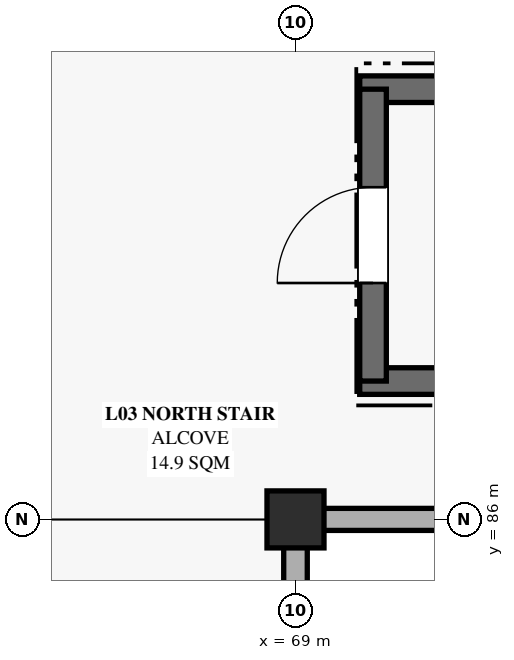
"""IFC4 building model, lengths in metres.
Left out: names, types, materials, properties, quantities, classifications, styles, units other than length and angle.
Written with IfcOpenShell. Run it as: python <this file> out.ifc"""

import sys

from ifc_helpers import new_model, si_unit, direction, frame, frame_2d, origin, origin_2d, place, context, subcontext, project, spatial, rectangle, extrude, element, fill, save


model = new_model("IFC4")
c1 = context("Model", 3, precision=1e-05, world=origin(), true_north=direction((0.0, 1.0)))
c2 = subcontext(c1, "Body", "Model", "MODEL_VIEW")
j1 = project(units=[si_unit("LENGTHUNIT", "METRE"), si_unit("PLANEANGLEUNIT", "RADIAN")], contexts=[c1])
p1 = place(None, origin())
s1 = spatial("IfcSite", under=j1, at=p1, CompositionType="ELEMENT")
p2 = place(p1, origin())
s2 = spatial("IfcBuilding", under=s1, at=p2, CompositionType="ELEMENT")
p3 = place(p2, frame((0.0, 0.0, 15.12)))
s3 = spatial("IfcBuildingStorey", under=s2, at=p3, CompositionType="ELEMENT", Elevation=15.12)
p4 = place(p3, frame((69.0, 86.0, 0.0), z_axis=(0.0, 0.0, 1.0), x_axis=(1.0, 0.0, 0.0)))
e1 = element("IfcColumn", 1, at=p4, inside=s3, PredefinedType="COLUMN", context=c2, shape_type="SweptSolid", body=[
    extrude(rectangle(XDim=0.75, YDim=0.75, at=origin_2d()), origin(), (0.0, 0.0, 1.0), 4.68),
])
p5 = place(p3, frame((69.0, 85.64, 0.0), z_axis=(0.0, 0.0, 1.0), x_axis=(0.0, -1.0, 0.0)))
e2 = element("IfcWall", 2, at=p5, inside=s3, PredefinedType="SOLIDWALL", context=c2, shape_type="SweptSolid", body=[
    extrude(rectangle(XDim=6.48, YDim=0.31, at=frame_2d((3.24, 0.0))), origin(), (0.0, 0.0, 1.0), 3.18),
])
p6 = place(p5, frame((2.39, 0.0, 0.85)))
e3 = element("IfcOpeningElement", 3, at=p6, cuts=e2, PredefinedType="OPENING", context=c2, shape_type="SweptSolid", body=[
    extrude(rectangle(XDim=1.7, YDim=2.0, at=frame_2d((0.85, 1.0))), frame((0.0, 0.165, 0.0), z_axis=(0.0, -1.0, 0.0), x_axis=(1.0, 0.0, 0.0)), (0.0, 0.0, 1.0), 0.33),
])
p7 = place(p3, frame((75.84, 86.0, 0.0), z_axis=(0.0, 0.0, 1.0), x_axis=(-1.0, 0.0, 0.0)))
e4 = element("IfcWall", 4, at=p7, inside=s3, PredefinedType="SOLIDWALL", context=c2, shape_type="SweptSolid", body=[
    extrude(rectangle(XDim=6.48, YDim=0.29, at=frame_2d((3.24, 0.0))), origin(), (0.0, 0.0, 1.0), 3.18),
])
p8 = place(p7, frame((2.59, 0.0, 0.85)))
e5 = element("IfcOpeningElement", 5, at=p8, cuts=e4, PredefinedType="OPENING", context=c2, shape_type="SweptSolid", body=[
    extrude(rectangle(XDim=1.3, YDim=1.9, at=frame_2d((0.65, 0.95))), frame((0.0, 0.155, 0.0), z_axis=(0.0, -1.0, 0.0), x_axis=(1.0, 0.0, 0.0)), (0.0, 0.0, 1.0), 0.31),
])
for number, where, z_axis, x_axis in (
    (6, (77.855, 87.82, 0.0), (0.0, 0.0, 1.0), (-1.0, 0.0, 0.0)),
    (7, (69.845, 91.66, 0.0), (0.0, 0.0, 1.0), (1.0, 0.0, 0.0)),
):
    element("IfcWall", number, at=place(p3, frame(where, z_axis=z_axis, x_axis=x_axis)), inside=s3, PredefinedType="SHEAR", context=c2, shape_type="SweptSolid", body=[
        extrude(rectangle(XDim=8.01, YDim=0.35, at=frame_2d((4.005, 0.0))), origin(), (0.0, 0.0, 1.0), 4.41),
    ])
p9 = place(p3, frame((70.02, 87.82, 0.0), z_axis=(0.0, 0.0, 1.0), x_axis=(0.0, 1.0, 0.0)))
e8 = element("IfcWall", 8, at=p9, inside=s3, PredefinedType="SHEAR", context=c2, shape_type="SweptSolid", body=[
    extrude(rectangle(XDim=3.84, YDim=0.35, at=frame_2d((1.92, 0.0))), origin(), (0.0, 0.0, 1.0), 4.41),
])
p10 = place(p9, frame((1.29, 0.0, 0.0)))
e9 = element("IfcOpeningElement", 9, at=p10, cuts=e8, PredefinedType="OPENING", context=c2, shape_type="SweptSolid", body=[
    extrude(rectangle(XDim=1.26, YDim=2.06, at=frame_2d((0.63, 1.03))), frame((0.0, 0.185, 0.0), z_axis=(0.0, -1.0, 0.0), x_axis=(1.0, 0.0, 0.0)), (0.0, 0.0, 1.0), 0.37),
])
p11 = place(p10, origin())
e10 = element("IfcDoor", 10, at=p11, inside=s3, OperationType="SINGLE_SWING_LEFT", PredefinedType="DOOR", context=c2, shape_type="SweptSolid", body=[
    extrude(rectangle(XDim=1.26, YDim=2.06, at=frame_2d((0.63, 1.03))), frame((0.0, 0.025, 0.0), z_axis=(0.0, -1.0, 0.0), x_axis=(1.0, 0.0, 0.0)), (0.0, 0.0, 1.0), 0.05),
])
fill(e9, e10)
save(model, sys.argv[1])
